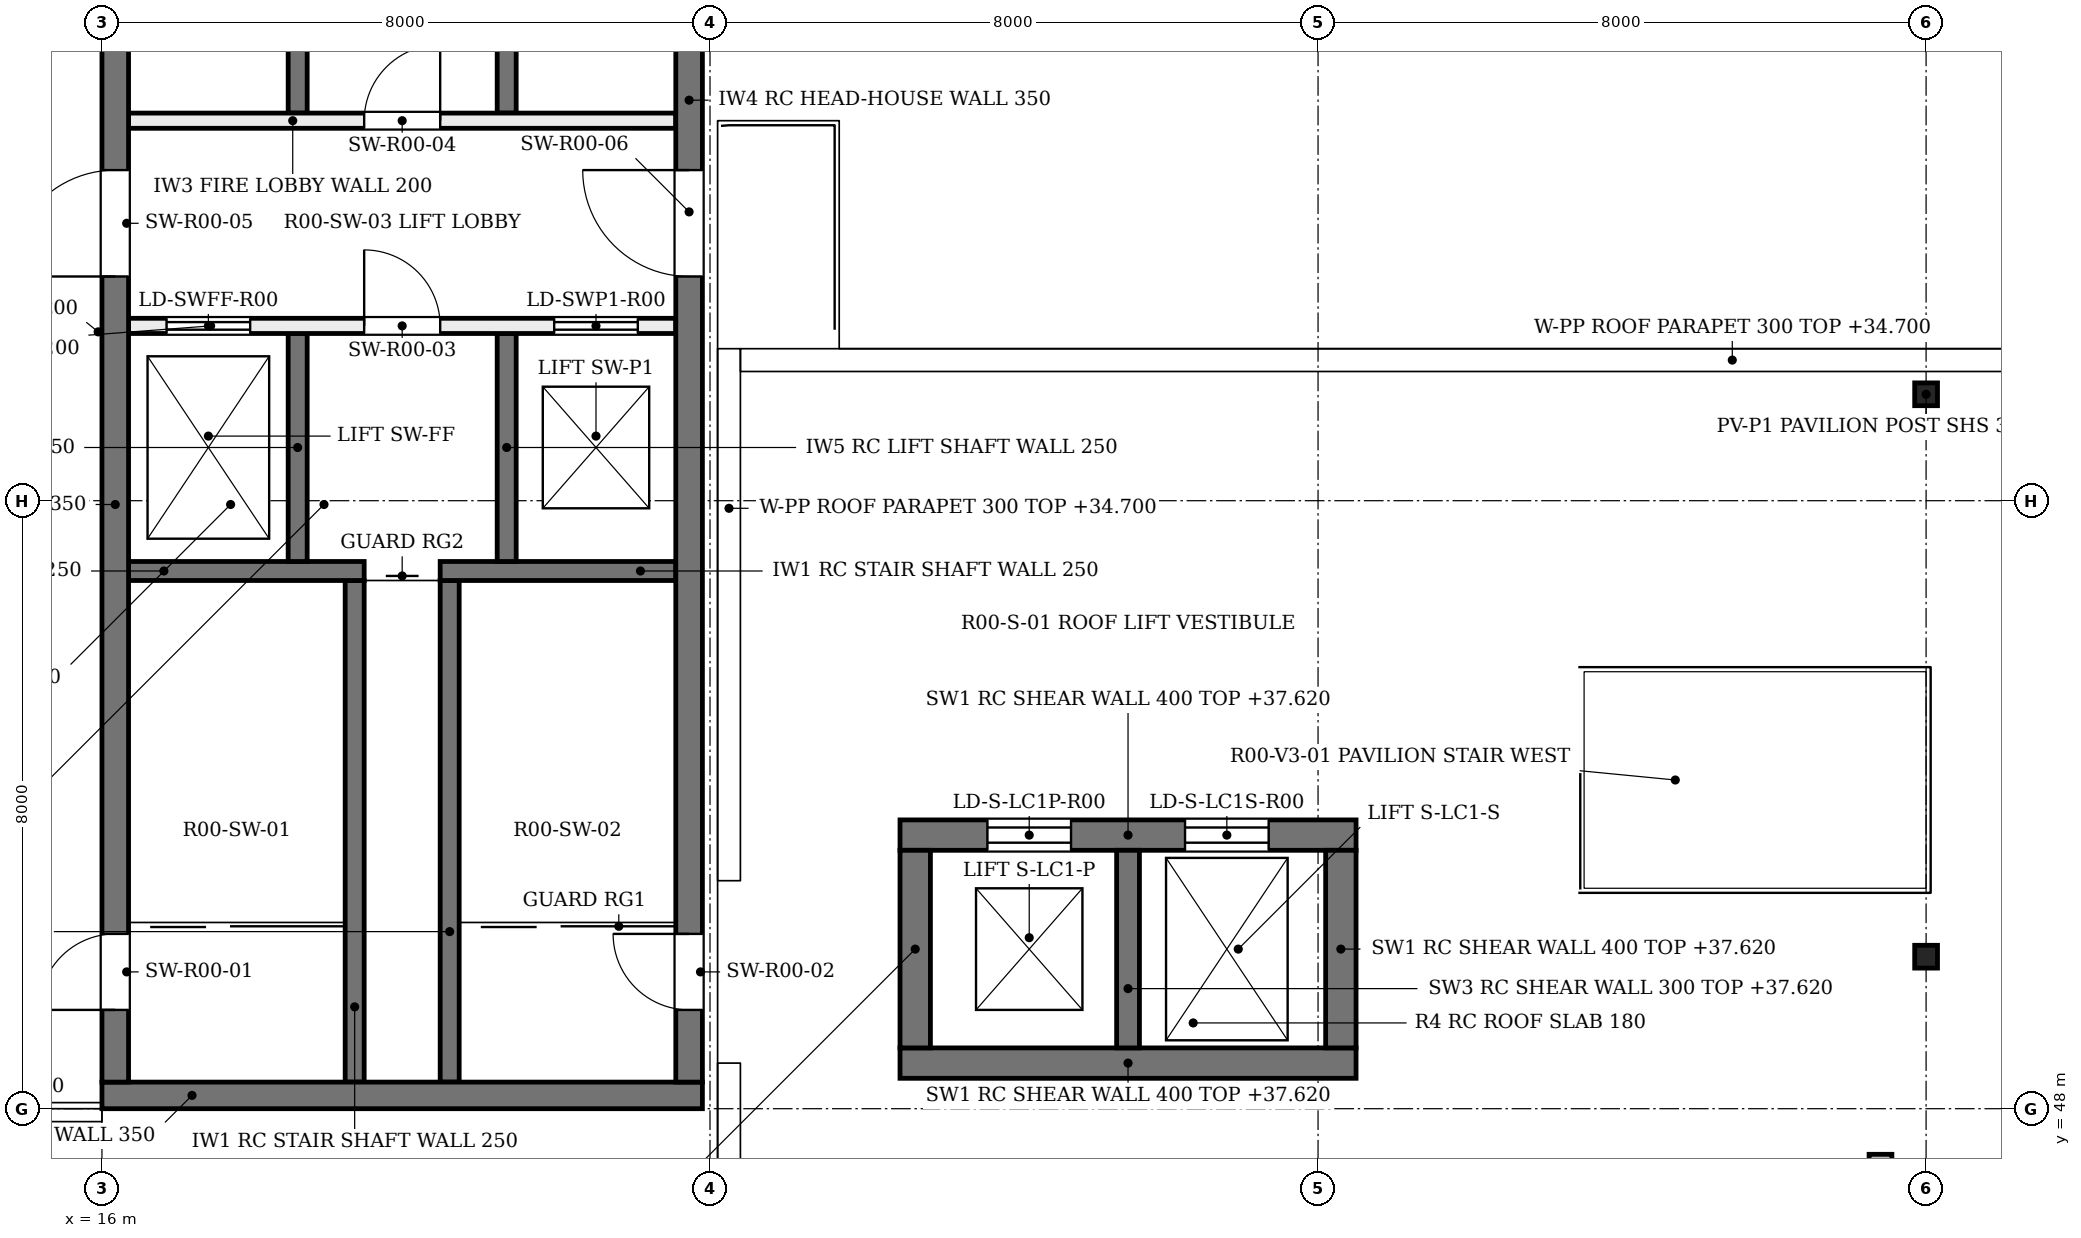
"""IFC4 building model, lengths in metres.
Left out: names, types, materials, properties, quantities, classifications, styles, units other than length and angle.
Written with IfcOpenShell. Run it as: python <this file> out.ifc"""

import sys

from ifc_helpers import new_model, si_unit, direction, frame, frame_2d, origin, origin_2d, place, context, subcontext, project, spatial, polyline, rectangle, hollow_rectangle, outline, extrude, element, fill, save


model = new_model("IFC4")
c1 = context("Model", 3, precision=1e-05, world=origin(), true_north=direction((0.0, 1.0)))
c2 = subcontext(c1, "Body", "Model", "MODEL_VIEW")
j1 = project(units=[si_unit("LENGTHUNIT", "METRE"), si_unit("PLANEANGLEUNIT", "RADIAN")], contexts=[c1])
p1 = place(None, origin())
s1 = spatial("IfcSite", under=j1, at=p1, CompositionType="ELEMENT")
p2 = place(p1, origin())
s2 = spatial("IfcBuilding", under=s1, at=p2, CompositionType="ELEMENT")
p3 = place(p2, frame((0.0, 0.0, 33.6)))
s3 = spatial("IfcBuildingStorey", under=s2, at=p3, CompositionType="ELEMENT", Elevation=33.6)
p4 = place(p3, frame((26.5, 48.6, 0.0), z_axis=(0.0, 0.0, 1.0), x_axis=(1.0, 0.0, 0.0)))
e1 = element("IfcWall", 1, at=p4, inside=s3, PredefinedType="SHEAR", context=c2, shape_type="SweptSolid", body=[
    extrude(rectangle(XDim=6.0, YDim=0.4, at=frame_2d((3.0, 0.0))), origin(), (0.0, 0.0, 1.0), 4.02),
])
p5 = place(p3, frame((26.5, 51.6, 0.0), z_axis=(0.0, 0.0, 1.0), x_axis=(1.0, 0.0, 0.0)))
e2 = element("IfcWall", 2, at=p5, inside=s3, PredefinedType="SHEAR", context=c2, shape_type="SweptSolid", body=[
    extrude(rectangle(XDim=6.0, YDim=0.4, at=frame_2d((3.0, 0.0))), origin(), (0.0, 0.0, 1.0), 4.02),
])
p6 = place(p5, frame((1.15, 0.0, 0.0)))
e3 = element("IfcOpeningElement", 3, at=p6, cuts=e2, PredefinedType="OPENING", context=c2, shape_type="SweptSolid", body=[
    extrude(rectangle(XDim=1.1, YDim=2.1, at=frame_2d((0.55, 1.05))), frame((0.0, 0.21, 0.0), z_axis=(0.0, -1.0, 0.0), x_axis=(1.0, 0.0, 0.0)), (0.0, 0.0, 1.0), 0.42),
])
p7 = place(p5, frame((3.75, 0.0, 0.0)))
e4 = element("IfcOpeningElement", 4, at=p7, cuts=e2, PredefinedType="OPENING", context=c2, shape_type="SweptSolid", body=[
    extrude(rectangle(XDim=1.1, YDim=2.1, at=frame_2d((0.55, 1.05))), frame((0.0, 0.21, 0.0), z_axis=(0.0, -1.0, 0.0), x_axis=(1.0, 0.0, 0.0)), (0.0, 0.0, 1.0), 0.42),
])
for number, where, z_axis, x_axis in (
    (5, (26.7, 48.8, 0.0), (0.0, 0.0, 1.0), (0.0, 1.0, 0.0)),
    (6, (32.3, 48.8, 0.0), (0.0, 0.0, 1.0), (0.0, 1.0, 0.0)),
):
    element("IfcWall", number, at=place(p3, frame(where, z_axis=z_axis, x_axis=x_axis)), inside=s3, PredefinedType="SHEAR", context=c2, shape_type="SweptSolid", body=[
        extrude(rectangle(XDim=2.6, YDim=0.4, at=frame_2d((1.3, 0.0))), origin(), (0.0, 0.0, 1.0), 4.02),
    ])
p8 = place(p3, frame((29.5, 48.8, 0.0), z_axis=(0.0, 0.0, 1.0), x_axis=(0.0, 1.0, 0.0)))
e7 = element("IfcWall", 7, at=p8, inside=s3, PredefinedType="SHEAR", context=c2, shape_type="SweptSolid", body=[
    extrude(rectangle(XDim=2.6, YDim=0.3, at=frame_2d((1.3, 0.0))), origin(), (0.0, 0.0, 1.0), 4.02),
])
for number, where, z_axis, x_axis in (
    (8, (40.0, 50.0, 0.0), (0.0, 0.0, 1.0), (1.0, 0.0, 0.0)),
    (9, (40.0, 57.4, 0.0), (0.0, 0.0, 1.0), (1.0, 0.0, 0.0)),
):
    element("IfcColumn", number, at=place(p3, frame(where, z_axis=z_axis, x_axis=x_axis)), inside=s3, PredefinedType="COLUMN", context=c2, shape_type="SweptSolid", body=[
        extrude(hollow_rectangle(XDim=0.3, YDim=0.3, WallThickness=0.012, InnerFilletRadius=0.012, OuterFilletRadius=0.019, at=origin_2d()), origin(), (0.0, 0.0, 1.0), 3.5),
    ])
p9 = place(p3, frame((39.4, 42.4, 0.0), z_axis=(0.0, 0.0, 1.0), x_axis=(0.0, 1.0, 0.0)))
e10 = element("IfcWall", 10, at=p9, inside=s3, PredefinedType="SOLIDWALL", context=c2, shape_type="SweptSolid", body=[
    extrude(outline(polyline([(0.0, 0.0), (5.0, 0.0), (5.0, 12.8), (1.6, 16.8), (0.0, 17.4), (0.0, 0.0)])), frame((0.0, 0.15, 0.0), z_axis=(0.0, -1.0, 0.0), x_axis=(1.0, 0.0, 0.0)), (0.0, 0.0, 1.0), 0.3),
])
p10 = place(p3, frame((8.0, 47.955, 0.0), z_axis=(0.0, 0.0, 1.0), x_axis=(1.0, 0.0, 0.0)))
e11 = element("IfcWall", 11, at=p10, inside=s3, PredefinedType="PARAPET", context=c2, shape_type="SweptSolid", body=[
    extrude(rectangle(XDim=8.0, YDim=0.25, at=frame_2d((4.0, 0.0))), origin(), (0.0, 0.0, 1.0), 1.1),
])
p11 = place(p3, frame((24.25, 42.0, 0.0), z_axis=(0.0, 0.0, 1.0), x_axis=(0.0, 1.0, 0.0)))
e12 = element("IfcWall", 12, at=p11, inside=s3, PredefinedType="PARAPET", context=c2, shape_type="SweptSolid", body=[
    extrude(rectangle(XDim=6.6, YDim=0.3, at=frame_2d((3.3, 0.0))), origin(), (0.0, 0.0, 1.0), 1.1),
])
p12 = place(p3, frame((24.25, 51.0, 0.0), z_axis=(0.0, 0.0, 1.0), x_axis=(0.0, 1.0, 0.0)))
e13 = element("IfcWall", 13, at=p12, inside=s3, PredefinedType="PARAPET", context=c2, shape_type="SweptSolid", body=[
    extrude(rectangle(XDim=7.0, YDim=0.3, at=frame_2d((3.5, 0.0))), origin(), (0.0, 0.0, 1.0), 1.1),
])
p13 = place(p3, frame((24.4, 57.85, 0.0), z_axis=(0.0, 0.0, 1.0), x_axis=(1.0, 0.0, 0.0)))
e14 = element("IfcWall", 14, at=p13, inside=s3, PredefinedType="PARAPET", context=c2, shape_type="SweptSolid", body=[
    extrude(rectangle(XDim=55.2, YDim=0.3, at=frame_2d((27.6, 0.0))), origin(), (0.0, 0.0, 1.0), 1.1),
])
for number, where, z_axis, x_axis in (
    (15, (19.325, 48.35, 0.0), (0.0, 0.0, 1.0), (0.0, 1.0, 0.0)),
    (16, (20.575, 48.35, 0.0), (0.0, 0.0, 1.0), (0.0, 1.0, 0.0)),
):
    element("IfcWall", number, at=place(p3, frame(where, z_axis=z_axis, x_axis=x_axis)), inside=s3, PredefinedType="SOLIDWALL", context=c2, shape_type="SweptSolid", body=[
        extrude(rectangle(XDim=6.6, YDim=0.25, at=frame_2d((3.3, 0.0))), origin(), (0.0, 0.0, 1.0), 4.5),
    ])
p14 = place(p3, frame((16.35, 55.075, 0.0), z_axis=(0.0, 0.0, 1.0), x_axis=(1.0, 0.0, 0.0)))
e17 = element("IfcWall", 17, at=p14, inside=s3, PredefinedType="SOLIDWALL", context=c2, shape_type="SweptSolid", body=[
    extrude(rectangle(XDim=3.1, YDim=0.25, at=frame_2d((1.55, 0.0))), origin(), (0.0, 0.0, 1.0), 4.5),
])
p15 = place(p3, frame((20.45, 55.075, 0.0), z_axis=(0.0, 0.0, 1.0), x_axis=(1.0, 0.0, 0.0)))
e18 = element("IfcWall", 18, at=p15, inside=s3, PredefinedType="SOLIDWALL", context=c2, shape_type="SweptSolid", body=[
    extrude(rectangle(XDim=3.1, YDim=0.25, at=frame_2d((1.55, 0.0))), origin(), (0.0, 0.0, 1.0), 4.5),
])
p16 = place(p3, frame((18.575, 55.2, 0.0), z_axis=(0.0, 0.0, 1.0), x_axis=(0.0, 1.0, 0.0)))
e19 = element("IfcWall", 19, at=p16, inside=s3, PredefinedType="SOLIDWALL", context=c2, shape_type="SweptSolid", body=[
    extrude(rectangle(XDim=3.0, YDim=0.25, at=frame_2d((1.5, 0.0))), origin(), (0.0, 0.0, 1.0), 4.5),
])
p17 = place(p3, frame((18.575, 61.1, 0.0), z_axis=(0.0, 0.0, 1.0), x_axis=(0.0, 1.0, 0.0)))
e20 = element("IfcWall", 20, at=p17, inside=s3, PredefinedType="SOLIDWALL", context=c2, shape_type="SweptSolid", body=[
    extrude(rectangle(XDim=2.45, YDim=0.25, at=frame_2d((1.225, 0.0))), origin(), (0.0, 0.0, 1.0), 4.5),
])
p18 = place(p3, frame((21.325, 55.2, 0.0), z_axis=(0.0, 0.0, 1.0), x_axis=(0.0, 1.0, 0.0)))
e21 = element("IfcWall", 21, at=p18, inside=s3, PredefinedType="SOLIDWALL", context=c2, shape_type="SweptSolid", body=[
    extrude(rectangle(XDim=3.0, YDim=0.25, at=frame_2d((1.5, 0.0))), origin(), (0.0, 0.0, 1.0), 4.5),
])
p19 = place(p3, frame((21.325, 61.1, 0.0), z_axis=(0.0, 0.0, 1.0), x_axis=(0.0, 1.0, 0.0)))
e22 = element("IfcWall", 22, at=p19, inside=s3, PredefinedType="SOLIDWALL", context=c2, shape_type="SweptSolid", body=[
    extrude(rectangle(XDim=2.45, YDim=0.25, at=frame_2d((1.225, 0.0))), origin(), (0.0, 0.0, 1.0), 4.5),
])
p20 = place(p3, frame((16.35, 58.3, 0.0), z_axis=(0.0, 0.0, 1.0), x_axis=(1.0, 0.0, 0.0)))
e23 = element("IfcWall", 23, at=p20, inside=s3, PredefinedType="SOLIDWALL", context=c2, shape_type="SweptSolid", body=[
    extrude(rectangle(XDim=7.2, YDim=0.2, at=frame_2d((3.6, 0.0))), origin(), (0.0, 0.0, 1.0), 4.5),
])
p21 = place(p20, frame((0.5, 0.0, 0.0)))
e24 = element("IfcOpeningElement", 24, at=p21, cuts=e23, PredefinedType="OPENING", context=c2, shape_type="SweptSolid", body=[
    extrude(rectangle(XDim=1.1, YDim=2.1, at=frame_2d((0.55, 1.05))), frame((0.0, 0.11, 0.0), z_axis=(0.0, -1.0, 0.0), x_axis=(1.0, 0.0, 0.0)), (0.0, 0.0, 1.0), 0.22),
])
p22 = place(p20, frame((5.6, 0.0, 0.0)))
e25 = element("IfcOpeningElement", 25, at=p22, cuts=e23, PredefinedType="OPENING", context=c2, shape_type="SweptSolid", body=[
    extrude(rectangle(XDim=1.1, YDim=2.1, at=frame_2d((0.55, 1.05))), frame((0.0, 0.11, 0.0), z_axis=(0.0, -1.0, 0.0), x_axis=(1.0, 0.0, 0.0)), (0.0, 0.0, 1.0), 0.22),
])
p23 = place(p20, frame((3.1, 0.0, 0.0)))
e26 = element("IfcOpeningElement", 26, at=p23, cuts=e23, PredefinedType="OPENING", context=c2, shape_type="SweptSolid", body=[
    extrude(rectangle(XDim=1.0, YDim=2.1, at=frame_2d((0.5, 1.05))), frame((0.0, 0.11, 0.0), z_axis=(0.0, -1.0, 0.0), x_axis=(1.0, 0.0, 0.0)), (0.0, 0.0, 1.0), 0.22),
])
p24 = place(p3, frame((16.35, 61.0, 0.0), z_axis=(0.0, 0.0, 1.0), x_axis=(1.0, 0.0, 0.0)))
e27 = element("IfcWall", 27, at=p24, inside=s3, PredefinedType="SOLIDWALL", context=c2, shape_type="SweptSolid", body=[
    extrude(rectangle(XDim=7.2, YDim=0.2, at=frame_2d((3.6, 0.0))), origin(), (0.0, 0.0, 1.0), 4.5),
])
p25 = place(p24, frame((3.1, 0.0, 0.0)))
e28 = element("IfcOpeningElement", 28, at=p25, cuts=e27, PredefinedType="OPENING", context=c2, shape_type="SweptSolid", body=[
    extrude(rectangle(XDim=1.0, YDim=2.1, at=frame_2d((0.5, 1.05))), frame((0.0, 0.11, 0.0), z_axis=(0.0, -1.0, 0.0), x_axis=(1.0, 0.0, 0.0)), (0.0, 0.0, 1.0), 0.22),
])
p26 = place(p3, frame((16.0, 48.175, 0.0), z_axis=(0.0, 0.0, 1.0), x_axis=(1.0, 0.0, 0.0)))
e29 = element("IfcWall", 29, at=p26, inside=s3, PredefinedType="SOLIDWALL", context=c2, shape_type="SweptSolid", body=[
    extrude(rectangle(XDim=7.9, YDim=0.35, at=frame_2d((3.95, 0.0))), origin(), (0.0, 0.0, 1.0), 4.5),
])
p27 = place(p3, frame((16.175, 48.35, 0.0), z_axis=(0.0, 0.0, 1.0), x_axis=(0.0, 1.0, 0.0)))
e30 = element("IfcWall", 30, at=p27, inside=s3, PredefinedType="SOLIDWALL", context=c2, shape_type="SweptSolid", body=[
    extrude(rectangle(XDim=15.2, YDim=0.35, at=frame_2d((7.6, 0.0))), origin(), (0.0, 0.0, 1.0), 4.5),
])
p28 = place(p27, frame((0.95, 0.0, 0.0)))
e31 = element("IfcOpeningElement", 31, at=p28, cuts=e30, PredefinedType="OPENING", context=c2, shape_type="SweptSolid", body=[
    extrude(rectangle(XDim=1.0, YDim=2.1, at=frame_2d((0.5, 1.05))), frame((0.0, 0.185, 0.0), z_axis=(0.0, -1.0, 0.0), x_axis=(1.0, 0.0, 0.0)), (0.0, 0.0, 1.0), 0.37),
])
p29 = place(p27, frame((10.6, 0.0, 0.0)))
e32 = element("IfcOpeningElement", 32, at=p29, cuts=e30, PredefinedType="OPENING", context=c2, shape_type="SweptSolid", body=[
    extrude(rectangle(XDim=1.4, YDim=2.1, at=frame_2d((0.7, 1.05))), frame((0.0, 0.185, 0.0), z_axis=(0.0, -1.0, 0.0), x_axis=(1.0, 0.0, 0.0)), (0.0, 0.0, 1.0), 0.37),
])
p30 = place(p3, frame((23.725, 48.35, 0.0), z_axis=(0.0, 0.0, 1.0), x_axis=(0.0, 1.0, 0.0)))
e33 = element("IfcWall", 33, at=p30, inside=s3, PredefinedType="SOLIDWALL", context=c2, shape_type="SweptSolid", body=[
    extrude(rectangle(XDim=15.2, YDim=0.35, at=frame_2d((7.6, 0.0))), origin(), (0.0, 0.0, 1.0), 4.5),
])
p31 = place(p30, frame((0.95, 0.0, 0.0)))
e34 = element("IfcOpeningElement", 34, at=p31, cuts=e33, PredefinedType="OPENING", context=c2, shape_type="SweptSolid", body=[
    extrude(rectangle(XDim=1.0, YDim=2.1, at=frame_2d((0.5, 1.05))), frame((0.0, 0.185, 0.0), z_axis=(0.0, -1.0, 0.0), x_axis=(1.0, 0.0, 0.0)), (0.0, 0.0, 1.0), 0.37),
])
p32 = place(p30, frame((10.6, 0.0, 0.0)))
e35 = element("IfcOpeningElement", 35, at=p32, cuts=e33, PredefinedType="OPENING", context=c2, shape_type="SweptSolid", body=[
    extrude(rectangle(XDim=1.4, YDim=2.1, at=frame_2d((0.7, 1.05))), frame((0.0, 0.185, 0.0), z_axis=(0.0, -1.0, 0.0), x_axis=(1.0, 0.0, 0.0)), (0.0, 0.0, 1.0), 0.37),
])
p33 = place(p28, origin())
e36 = element("IfcDoor", 36, at=p33, inside=s3, OperationType="SINGLE_SWING_LEFT", PredefinedType="DOOR", context=c2, shape_type="SweptSolid", body=[
    extrude(rectangle(XDim=1.0, YDim=2.1, at=frame_2d((0.5, 1.05))), frame((0.0, 0.025, 0.0), z_axis=(0.0, -1.0, 0.0), x_axis=(1.0, 0.0, 0.0)), (0.0, 0.0, 1.0), 0.05),
])
fill(e31, e36)
p34 = place(p31, frame((1.0, 0.0, 0.0), z_axis=(0.0, 0.0, 1.0), x_axis=(-1.0, 0.0, 0.0)))
e37 = element("IfcDoor", 37, at=p34, inside=s3, OperationType="SINGLE_SWING_RIGHT", PredefinedType="DOOR", context=c2, shape_type="SweptSolid", body=[
    extrude(rectangle(XDim=1.0, YDim=2.1, at=frame_2d((0.5, 1.05))), frame((0.0, 0.025, 0.0), z_axis=(0.0, -1.0, 0.0), x_axis=(1.0, 0.0, 0.0)), (0.0, 0.0, 1.0), 0.05),
])
fill(e34, e37)
p35 = place(p21, origin())
e38 = element("IfcDoor", 38, at=p35, inside=s3, OperationType="DOUBLE_DOOR_SLIDING", PredefinedType="DOOR", context=c2, shape_type="SweptSolid", body=[
    extrude(rectangle(XDim=1.1, YDim=2.1, at=frame_2d((0.55, 1.05))), frame((0.0, 0.025, 0.0), z_axis=(0.0, -1.0, 0.0), x_axis=(1.0, 0.0, 0.0)), (0.0, 0.0, 1.0), 0.05),
])
fill(e24, e38)
p36 = place(p22, origin())
e39 = element("IfcDoor", 39, at=p36, inside=s3, OperationType="DOUBLE_DOOR_SLIDING", PredefinedType="DOOR", context=c2, shape_type="SweptSolid", body=[
    extrude(rectangle(XDim=1.1, YDim=2.1, at=frame_2d((0.55, 1.05))), frame((0.0, 0.025, 0.0), z_axis=(0.0, -1.0, 0.0), x_axis=(1.0, 0.0, 0.0)), (0.0, 0.0, 1.0), 0.05),
])
fill(e25, e39)
p37 = place(p23, origin())
e40 = element("IfcDoor", 40, at=p37, inside=s3, OperationType="SINGLE_SWING_LEFT", PredefinedType="DOOR", context=c2, shape_type="SweptSolid", body=[
    extrude(rectangle(XDim=1.0, YDim=2.1, at=frame_2d((0.5, 1.05))), frame((0.0, 0.025, 0.0), z_axis=(0.0, -1.0, 0.0), x_axis=(1.0, 0.0, 0.0)), (0.0, 0.0, 1.0), 0.05),
])
fill(e26, e40)
p38 = place(p25, frame((1.0, 0.0, 0.0), z_axis=(0.0, 0.0, 1.0), x_axis=(-1.0, 0.0, 0.0)))
e41 = element("IfcDoor", 41, at=p38, inside=s3, OperationType="SINGLE_SWING_RIGHT", PredefinedType="DOOR", context=c2, shape_type="SweptSolid", body=[
    extrude(rectangle(XDim=1.0, YDim=2.1, at=frame_2d((0.5, 1.05))), frame((0.0, 0.025, 0.0), z_axis=(0.0, -1.0, 0.0), x_axis=(1.0, 0.0, 0.0)), (0.0, 0.0, 1.0), 0.05),
])
fill(e28, e41)
p39 = place(p29, origin())
e42 = element("IfcDoor", 42, at=p39, inside=s3, OperationType="SINGLE_SWING_LEFT", PredefinedType="DOOR", context=c2, shape_type="SweptSolid", body=[
    extrude(rectangle(XDim=1.4, YDim=2.1, at=frame_2d((0.7, 1.05))), frame((0.0, 0.025, 0.0), z_axis=(0.0, -1.0, 0.0), x_axis=(1.0, 0.0, 0.0)), (0.0, 0.0, 1.0), 0.05),
])
fill(e32, e42)
p40 = place(p32, frame((1.4, 0.0, 0.0), z_axis=(0.0, 0.0, 1.0), x_axis=(-1.0, 0.0, 0.0)))
e43 = element("IfcDoor", 43, at=p40, inside=s3, OperationType="SINGLE_SWING_RIGHT", PredefinedType="DOOR", context=c2, shape_type="SweptSolid", body=[
    extrude(rectangle(XDim=1.4, YDim=2.1, at=frame_2d((0.7, 1.05))), frame((0.0, 0.025, 0.0), z_axis=(0.0, -1.0, 0.0), x_axis=(1.0, 0.0, 0.0)), (0.0, 0.0, 1.0), 0.05),
])
fill(e35, e43)
p41 = place(p6, origin())
e44 = element("IfcDoor", 44, at=p41, inside=s3, OperationType="DOUBLE_DOOR_SLIDING", PredefinedType="DOOR", context=c2, shape_type="SweptSolid", body=[
    extrude(rectangle(XDim=1.1, YDim=2.1, at=frame_2d((0.55, 1.05))), frame((0.0, 0.025, 0.0), z_axis=(0.0, -1.0, 0.0), x_axis=(1.0, 0.0, 0.0)), (0.0, 0.0, 1.0), 0.05),
])
fill(e3, e44)
p42 = place(p7, origin())
e45 = element("IfcDoor", 45, at=p42, inside=s3, OperationType="DOUBLE_DOOR_SLIDING", PredefinedType="DOOR", context=c2, shape_type="SweptSolid", body=[
    extrude(rectangle(XDim=1.1, YDim=2.1, at=frame_2d((0.55, 1.05))), frame((0.0, 0.025, 0.0), z_axis=(0.0, -1.0, 0.0), x_axis=(1.0, 0.0, 0.0)), (0.0, 0.0, 1.0), 0.05),
])
fill(e4, e45)
save(model, sys.argv[1])
